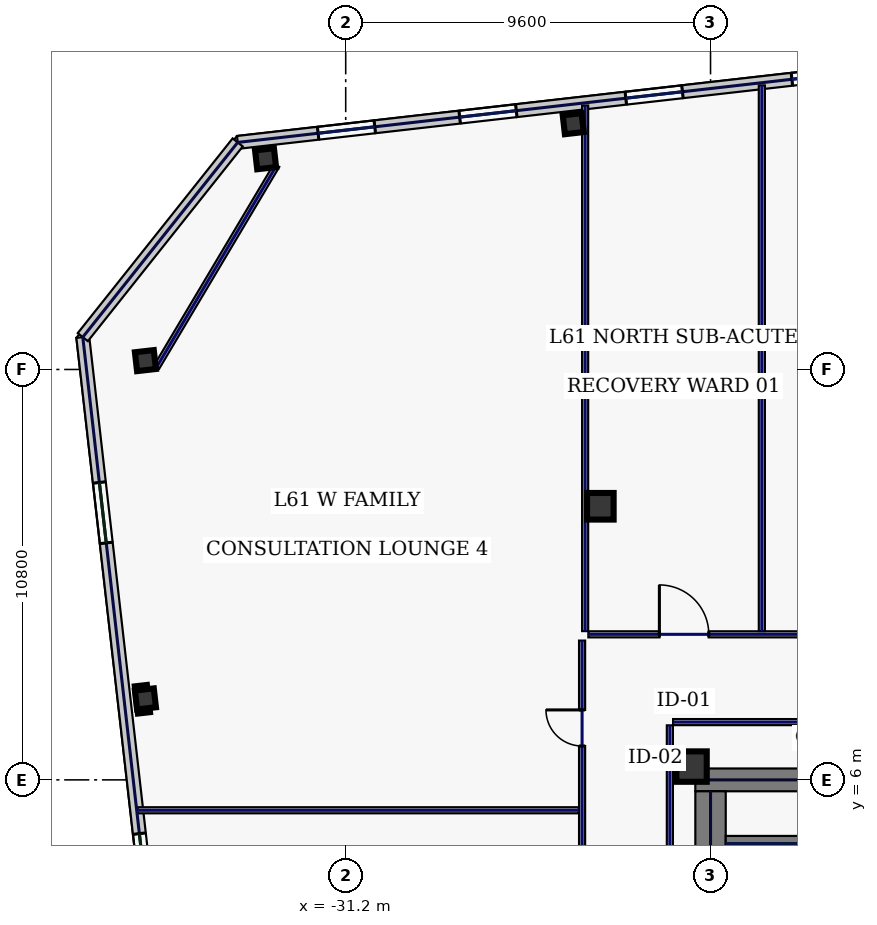
"""IFC4 building model, lengths in metres.
Left out: names, types, materials, properties, quantities, classifications, styles, units other than length and angle.
Written with IfcOpenShell. Run it as: python <this file> out.ifc"""

import sys

from ifc_helpers import new_model, si_unit, direction, frame, frame_2d, origin, origin_2d, place, context, subcontext, project, spatial, rectangle, hollow_rectangle, extrude, element, fill, save


model = new_model("IFC4")
c1 = context("Model", 3, precision=1e-05, world=origin(), true_north=direction((0.0, 1.0)))
c2 = subcontext(c1, "Body", "Model", "MODEL_VIEW")
j1 = project(units=[si_unit("LENGTHUNIT", "METRE"), si_unit("PLANEANGLEUNIT", "RADIAN")], contexts=[c1])
p1 = place(None, origin())
s1 = spatial("IfcSite", under=j1, at=p1, CompositionType="ELEMENT")
p2 = place(p1, origin())
s2 = spatial("IfcBuilding", under=s1, at=p2, CompositionType="ELEMENT")
p3 = place(p2, frame((0.0, 0.0, 263.0)))
s3 = spatial("IfcBuildingStorey", under=s2, at=p3, CompositionType="ELEMENT", Elevation=263.0)
p4 = place(p3, frame((-22.0, 6.0, 0.0), z_axis=(0.0, 0.0, 1.0), x_axis=(1.0, 0.0, 0.0)))
e1 = element("IfcWall", 1, at=p4, inside=s3, PredefinedType="SHEAR", context=c2, shape_type="SweptSolid", body=[
    extrude(rectangle(XDim=11.5, YDim=0.6, at=frame_2d((5.75, 0.0))), origin(), (0.0, 0.0, 1.0), 3.74),
])
p5 = place(p3, frame((-21.6, -5.7, 0.0), z_axis=(0.0, 0.0, 1.0), x_axis=(0.0, 1.0, 0.0)))
e2 = element("IfcWall", 2, at=p5, inside=s3, PredefinedType="SHEAR", context=c2, shape_type="SweptSolid", body=[
    extrude(rectangle(XDim=11.4, YDim=0.8, at=frame_2d((5.7, 0.0))), origin(), (0.0, 0.0, 1.0), 3.74),
])
p6 = place(p3, frame((-21.2, 4.325, 0.0), z_axis=(0.0, 0.0, 1.0), x_axis=(1.0, 0.0, 0.0)))
e3 = element("IfcWall", 3, at=p6, inside=s3, PredefinedType="SHEAR", context=c2, shape_type="SweptSolid", body=[
    extrude(rectangle(XDim=3.4, YDim=0.4, at=frame_2d((1.7, 0.0))), origin(), (0.0, 0.0, 1.0), 3.74),
])
p7 = place(p3, frame((-22.1, 6.35, 0.0), z_axis=(0.0, 0.0, 1.0), x_axis=(1.0, 0.0, 0.0)))
e4 = element("IfcColumn", 4, at=p7, inside=s3, PredefinedType="COLUMN", context=c2, shape_type="SweptSolid", body=[
    extrude(hollow_rectangle(XDim=0.8, YDim=0.8, WallThickness=0.036, at=origin_2d()), origin(), (0.0, 0.0, 1.0), 3.74),
])
p8 = place(p3, frame((-24.5, 13.2, 0.0), z_axis=(0.0, 0.0, 1.0), x_axis=(1.0, 0.0, 0.0)))
e5 = element("IfcColumn", 5, at=p8, inside=s3, PredefinedType="COLUMN", context=c2, shape_type="SweptSolid", body=[
    extrude(hollow_rectangle(XDim=0.7, YDim=0.7, WallThickness=0.032, at=origin_2d()), origin(), (0.0, 0.0, 1.0), 3.74),
])
for number, where, z_axis, x_axis in (
    (6, (-25.212, 23.268, 0.0), (0.0, 0.0, 1.0), (0.994, 0.113, 0.0)),
    (7, (-33.309, 22.345, 0.0), (0.0, 0.0, 1.0), (0.994, 0.113, 0.0)),
    (8, (-36.47, 17.033, 0.0), (0.0, 0.0, 1.0), (0.994, 0.113, 0.0)),
    (9, (-36.47, 8.131, 0.0), (0.0, 0.0, 1.0), (0.994, 0.113, 0.0)),
):
    element("IfcColumn", number, at=place(p3, frame(where, z_axis=z_axis, x_axis=x_axis)), inside=s3, PredefinedType="COLUMN", context=c2, shape_type="SweptSolid", body=[
        extrude(hollow_rectangle(XDim=0.5, YDim=0.5, WallThickness=0.025, at=origin_2d()), origin(), (0.0, 0.0, 1.0), 3.74),
    ])
p9 = place(p3, frame((-15.51, 24.886, 0.0), z_axis=(0.0, 0.0, 1.0), x_axis=(-0.993572271362, -0.113199565282, 0.0)))
e10 = element("IfcWall", 10, at=p9, inside=s3, PredefinedType="STANDARD", context=c2, shape_type="SweptSolid", body=[
    extrude(rectangle(XDim=18.651, YDim=0.34, at=frame_2d((9.326, 0.0))), origin(), (0.0, 0.0, 1.0), 3.74),
])
p10 = place(p9, frame((15.021, 0.0, 0.83)))
e11 = element("IfcOpeningElement", 11, at=p10, cuts=e10, PredefinedType="OPENING", context=c2, shape_type="SweptSolid", body=[
    extrude(rectangle(XDim=1.5, YDim=2.0, at=frame_2d((0.75, 1.0))), frame((0.0, 0.18, 0.0), z_axis=(0.0, -1.0, 0.0), x_axis=(1.0, 0.0, 0.0)), (0.0, 0.0, 1.0), 0.36),
])
p11 = place(p9, frame((11.273, 0.0, 0.83)))
e12 = element("IfcOpeningElement", 12, at=p11, cuts=e10, PredefinedType="OPENING", context=c2, shape_type="SweptSolid", body=[
    extrude(rectangle(XDim=1.5, YDim=2.0, at=frame_2d((0.75, 1.0))), frame((0.0, 0.18, 0.0), z_axis=(0.0, -1.0, 0.0), x_axis=(1.0, 0.0, 0.0)), (0.0, 0.0, 1.0), 0.36),
])
p12 = place(p9, frame((6.873, 0.0, 0.83)))
e13 = element("IfcOpeningElement", 13, at=p12, cuts=e10, PredefinedType="OPENING", context=c2, shape_type="SweptSolid", body=[
    extrude(rectangle(XDim=1.5, YDim=2.0, at=frame_2d((0.75, 1.0))), frame((0.0, 0.18, 0.0), z_axis=(0.0, -1.0, 0.0), x_axis=(1.0, 0.0, 0.0)), (0.0, 0.0, 1.0), 0.36),
])
p13 = place(p9, frame((3.125, 0.0, 0.83)))
e14 = element("IfcOpeningElement", 14, at=p13, cuts=e10, PredefinedType="OPENING", context=c2, shape_type="SweptSolid", body=[
    extrude(rectangle(XDim=0.85, YDim=1.85, at=frame_2d((0.425, 0.925))), frame((0.0, 0.18, 0.0), z_axis=(0.0, -1.0, 0.0), x_axis=(1.0, 0.0, 0.0)), (0.0, 0.0, 1.0), 0.36),
])
p14 = place(p3, frame((-38.118, 17.651, 0.0), z_axis=(0.0, 0.0, 1.0), x_axis=(0.11320360501, -0.9935718111, 0.0)))
e15 = element("IfcWall", 15, at=p14, inside=s3, PredefinedType="STANDARD", context=c2, shape_type="SweptSolid", body=[
    extrude(rectangle(XDim=37.2, YDim=0.34, at=frame_2d((18.6, 0.0))), origin(), (0.0, 0.0, 1.0), 3.74),
])
p15 = place(p14, frame((3.85, 0.0, 0.58)))
e16 = element("IfcOpeningElement", 16, at=p15, cuts=e15, PredefinedType="OPENING", context=c2, shape_type="SweptSolid", body=[
    extrude(rectangle(XDim=1.6, YDim=2.3, at=frame_2d((0.8, 1.15))), frame((0.0, 0.18, 0.0), z_axis=(0.0, -1.0, 0.0), x_axis=(1.0, 0.0, 0.0)), (0.0, 0.0, 1.0), 0.36),
])
p16 = place(p14, frame((13.15, 0.0, 0.58)))
e17 = element("IfcOpeningElement", 17, at=p16, cuts=e15, PredefinedType="OPENING", context=c2, shape_type="SweptSolid", body=[
    extrude(rectangle(XDim=1.6, YDim=2.3, at=frame_2d((0.8, 1.15))), frame((0.0, 0.18, 0.0), z_axis=(0.0, -1.0, 0.0), x_axis=(1.0, 0.0, 0.0)), (0.0, 0.0, 1.0), 0.36),
])
p17 = place(p14, frame((31.75, 0.0, 0.58)))
e18 = element("IfcOpeningElement", 18, at=p17, cuts=e15, PredefinedType="OPENING", context=c2, shape_type="SweptSolid", body=[
    extrude(rectangle(XDim=1.6, YDim=2.3, at=frame_2d((0.8, 1.15))), frame((0.0, 0.18, 0.0), z_axis=(0.0, -1.0, 0.0), x_axis=(1.0, 0.0, 0.0)), (0.0, 0.0, 1.0), 0.36),
])
p18 = place(p3, frame((-34.042, 22.775, 0.0), z_axis=(0.0, 0.0, 1.0), x_axis=(-0.62252823689, -0.78259733853, 0.0)))
e19 = element("IfcWall", 19, at=p18, inside=s3, PredefinedType="STANDARD", context=c2, shape_type="SweptSolid", body=[
    extrude(rectangle(XDim=6.548, YDim=0.34, at=frame_2d((3.274, 0.0))), origin(), (0.0, 0.0, 1.0), 3.74),
])
p19 = place(p3, frame((-33.016, 22.171, 0.0), z_axis=(0.0, 0.0, 1.0), x_axis=(-0.511385266265, -0.859351563359, 0.0)))
e20 = element("IfcWall", 20, at=p19, inside=s3, PredefinedType="PARTITIONING", context=c2, shape_type="SweptSolid", body=[
    extrude(rectangle(XDim=6.182, YDim=0.16, at=frame_2d((3.091, 0.0))), origin(), (0.0, 0.0, 1.0), 3.74),
])
p20 = place(p3, frame((-24.98, -9.615, 0.0), z_axis=(0.0, 0.0, 1.0), x_axis=(0.0, 1.0, 0.0)))
e21 = element("IfcWall", 21, at=p20, inside=s3, PredefinedType="PARTITIONING", context=c2, shape_type="SweptSolid", body=[
    extrude(rectangle(XDim=19.28, YDim=0.16, at=frame_2d((9.64, 0.0))), origin(), (0.0, 0.0, 1.0), 3.74),
])
p21 = place(p20, frame((1.969, 0.0, 0.0)))
e22 = element("IfcOpeningElement", 22, at=p21, cuts=e21, PredefinedType="OPENING", context=c2, shape_type="SweptSolid", body=[
    extrude(rectangle(XDim=0.95, YDim=2.2, at=frame_2d((0.475, 1.1))), frame((0.0, 0.09, 0.0), z_axis=(0.0, -1.0, 0.0), x_axis=(1.0, 0.0, 0.0)), (0.0, 0.0, 1.0), 0.18),
])
p22 = place(p20, frame((7.25, 0.0, 0.0)))
e23 = element("IfcOpeningElement", 23, at=p22, cuts=e21, PredefinedType="OPENING", context=c2, shape_type="SweptSolid", body=[
    extrude(rectangle(XDim=0.95, YDim=2.2, at=frame_2d((0.475, 1.1))), frame((0.0, 0.09, 0.0), z_axis=(0.0, -1.0, 0.0), x_axis=(1.0, 0.0, 0.0)), (0.0, 0.0, 1.0), 0.18),
])
p23 = place(p20, frame((12.45, 0.0, 0.0)))
e24 = element("IfcOpeningElement", 24, at=p23, cuts=e21, PredefinedType="OPENING", context=c2, shape_type="SweptSolid", body=[
    extrude(rectangle(XDim=0.95, YDim=2.2, at=frame_2d((0.475, 1.1))), frame((0.0, 0.09, 0.0), z_axis=(0.0, -1.0, 0.0), x_axis=(1.0, 0.0, 0.0)), (0.0, 0.0, 1.0), 0.18),
])
p24 = place(p20, frame((16.506, 0.0, 0.0)))
e25 = element("IfcOpeningElement", 25, at=p24, cuts=e21, PredefinedType="OPENING", context=c2, shape_type="SweptSolid", body=[
    extrude(rectangle(XDim=0.95, YDim=2.2, at=frame_2d((0.475, 1.1))), frame((0.0, 0.09, 0.0), z_axis=(0.0, -1.0, 0.0), x_axis=(1.0, 0.0, 0.0)), (0.0, 0.0, 1.0), 0.18),
])
p25 = place(p3, frame((-24.815, 9.83, 0.0), z_axis=(0.0, 0.0, 1.0), x_axis=(1.0, 0.0, 0.0)))
e26 = element("IfcWall", 26, at=p25, inside=s3, PredefinedType="PARTITIONING", context=c2, shape_type="SweptSolid", body=[
    extrude(rectangle(XDim=49.63, YDim=0.16, at=frame_2d((24.815, 0.0))), origin(), (0.0, 0.0, 1.0), 3.74),
])
p26 = place(p25, frame((1.869, 0.0, 0.0)))
e27 = element("IfcOpeningElement", 27, at=p26, cuts=e26, PredefinedType="OPENING", context=c2, shape_type="SweptSolid", body=[
    extrude(rectangle(XDim=1.3, YDim=2.2, at=frame_2d((0.65, 1.1))), frame((0.0, 0.09, 0.0), z_axis=(0.0, -1.0, 0.0), x_axis=(1.0, 0.0, 0.0)), (0.0, 0.0, 1.0), 0.18),
])
p27 = place(p25, frame((7.613, 0.0, 0.0)))
e28 = element("IfcOpeningElement", 28, at=p27, cuts=e26, PredefinedType="OPENING", context=c2, shape_type="SweptSolid", body=[
    extrude(rectangle(XDim=0.95, YDim=2.2, at=frame_2d((0.475, 1.1))), frame((0.0, 0.09, 0.0), z_axis=(0.0, -1.0, 0.0), x_axis=(1.0, 0.0, 0.0)), (0.0, 0.0, 1.0), 0.18),
])
p28 = place(p25, frame((14.038, 0.0, 0.0)))
e29 = element("IfcOpeningElement", 29, at=p28, cuts=e26, PredefinedType="OPENING", context=c2, shape_type="SweptSolid", body=[
    extrude(rectangle(XDim=0.95, YDim=2.2, at=frame_2d((0.475, 1.1))), frame((0.0, 0.09, 0.0), z_axis=(0.0, -1.0, 0.0), x_axis=(1.0, 0.0, 0.0)), (0.0, 0.0, 1.0), 0.18),
])
p29 = place(p25, frame((21.125, 0.0, 0.0)))
e30 = element("IfcOpeningElement", 30, at=p29, cuts=e26, PredefinedType="OPENING", context=c2, shape_type="SweptSolid", body=[
    extrude(rectangle(XDim=1.3, YDim=2.2, at=frame_2d((0.65, 1.1))), frame((0.0, 0.09, 0.0), z_axis=(0.0, -1.0, 0.0), x_axis=(1.0, 0.0, 0.0)), (0.0, 0.0, 1.0), 0.18),
])
p30 = place(p25, frame((29.225, 0.0, 0.0)))
e31 = element("IfcOpeningElement", 31, at=p30, cuts=e26, PredefinedType="OPENING", context=c2, shape_type="SweptSolid", body=[
    extrude(rectangle(XDim=1.3, YDim=2.2, at=frame_2d((0.65, 1.1))), frame((0.0, 0.09, 0.0), z_axis=(0.0, -1.0, 0.0), x_axis=(1.0, 0.0, 0.0)), (0.0, 0.0, 1.0), 0.18),
])
p31 = place(p25, frame((36.312, 0.0, 0.0)))
e32 = element("IfcOpeningElement", 32, at=p31, cuts=e26, PredefinedType="OPENING", context=c2, shape_type="SweptSolid", body=[
    extrude(rectangle(XDim=0.95, YDim=2.2, at=frame_2d((0.475, 1.1))), frame((0.0, 0.09, 0.0), z_axis=(0.0, -1.0, 0.0), x_axis=(1.0, 0.0, 0.0)), (0.0, 0.0, 1.0), 0.18),
])
p32 = place(p25, frame((41.863, 0.0, 0.0)))
e33 = element("IfcOpeningElement", 33, at=p32, cuts=e26, PredefinedType="OPENING", context=c2, shape_type="SweptSolid", body=[
    extrude(rectangle(XDim=1.3, YDim=2.2, at=frame_2d((0.65, 1.1))), frame((0.0, 0.09, 0.0), z_axis=(0.0, -1.0, 0.0), x_axis=(1.0, 0.0, 0.0)), (0.0, 0.0, 1.0), 0.18),
])
p33 = place(p25, frame((46.806, 0.0, 0.0)))
e34 = element("IfcOpeningElement", 34, at=p33, cuts=e26, PredefinedType="OPENING", context=c2, shape_type="SweptSolid", body=[
    extrude(rectangle(XDim=0.95, YDim=2.2, at=frame_2d((0.475, 1.1))), frame((0.0, 0.09, 0.0), z_axis=(0.0, -1.0, 0.0), x_axis=(1.0, 0.0, 0.0)), (0.0, 0.0, 1.0), 0.18),
])
p34 = place(p3, frame((-10.715, 7.52, 0.0), z_axis=(0.0, 0.0, 1.0), x_axis=(-1.0, 0.0, 0.0)))
e35 = element("IfcWall", 35, at=p34, inside=s3, PredefinedType="PARTITIONING", context=c2, shape_type="SweptSolid", body=[
    extrude(rectangle(XDim=11.87, YDim=0.16, at=frame_2d((5.935, 0.0))), origin(), (0.0, 0.0, 1.0), 3.74),
])
p35 = place(p3, frame((-22.67, 7.435, 0.0), z_axis=(0.0, 0.0, 1.0), x_axis=(0.0, -1.0, 0.0)))
e36 = element("IfcWall", 36, at=p35, inside=s3, PredefinedType="PARTITIONING", context=c2, shape_type="SweptSolid", body=[
    extrude(rectangle(XDim=14.82, YDim=0.16, at=frame_2d((7.41, 0.0))), origin(), (0.0, 0.0, 1.0), 3.74),
])
p36 = place(p3, frame((-24.9, 9.915, 0.0), z_axis=(0.0, 0.0, 1.0), x_axis=(0.0, 1.0, 0.0)))
e37 = element("IfcWall", 37, at=p36, inside=s3, PredefinedType="PARTITIONING", context=c2, shape_type="SweptSolid", body=[
    extrude(rectangle(XDim=13.831, YDim=0.16, at=frame_2d((6.916, 0.0))), origin(), (0.0, 0.0, 1.0), 3.285),
])
p37 = place(p3, frame((-20.25, 9.915, 0.0), z_axis=(0.0, 0.0, 1.0), x_axis=(0.0, 1.0, 0.0)))
e38 = element("IfcWall", 38, at=p37, inside=s3, PredefinedType="PARTITIONING", context=c2, shape_type="SweptSolid", body=[
    extrude(rectangle(XDim=14.361, YDim=0.16, at=frame_2d((7.181, 0.0))), origin(), (0.0, 0.0, 1.0), 3.74),
])
p38 = place(p3, frame((-36.679, 5.2, 0.0), z_axis=(0.0, 0.0, 1.0), x_axis=(1.0, 0.0, 0.0)))
e39 = element("IfcWall", 39, at=p38, inside=s3, PredefinedType="PARTITIONING", context=c2, shape_type="SweptSolid", body=[
    extrude(rectangle(XDim=11.615, YDim=0.16, at=frame_2d((5.807, 0.0))), origin(), (0.0, 0.0, 1.0), 3.74),
])
p39 = place(p10, origin())
e40 = element("IfcWindow", 40, at=p39, inside=s3, PartitioningType="SINGLE_PANEL", PredefinedType="WINDOW", context=c2, shape_type="SweptSolid", body=[
    extrude(rectangle(XDim=1.5, YDim=2.0, at=frame_2d((0.75, 1.0))), frame((0.0, 0.03, 0.0), z_axis=(0.0, -1.0, 0.0), x_axis=(1.0, 0.0, 0.0)), (0.0, 0.0, 1.0), 0.06),
])
fill(e11, e40)
p40 = place(p11, origin())
e41 = element("IfcWindow", 41, at=p40, inside=s3, PartitioningType="SINGLE_PANEL", PredefinedType="WINDOW", context=c2, shape_type="SweptSolid", body=[
    extrude(rectangle(XDim=1.5, YDim=2.0, at=frame_2d((0.75, 1.0))), frame((0.0, 0.03, 0.0), z_axis=(0.0, -1.0, 0.0), x_axis=(1.0, 0.0, 0.0)), (0.0, 0.0, 1.0), 0.06),
])
fill(e12, e41)
p41 = place(p12, origin())
e42 = element("IfcWindow", 42, at=p41, inside=s3, PartitioningType="SINGLE_PANEL", PredefinedType="WINDOW", context=c2, shape_type="SweptSolid", body=[
    extrude(rectangle(XDim=1.5, YDim=2.0, at=frame_2d((0.75, 1.0))), frame((0.0, 0.03, 0.0), z_axis=(0.0, -1.0, 0.0), x_axis=(1.0, 0.0, 0.0)), (0.0, 0.0, 1.0), 0.06),
])
fill(e13, e42)
p42 = place(p13, origin())
e43 = element("IfcWindow", 43, at=p42, inside=s3, PartitioningType="SINGLE_PANEL", PredefinedType="WINDOW", context=c2, shape_type="SweptSolid", body=[
    extrude(rectangle(XDim=0.85, YDim=1.85, at=frame_2d((0.425, 0.925))), frame((0.0, 0.03, 0.0), z_axis=(0.0, -1.0, 0.0), x_axis=(1.0, 0.0, 0.0)), (0.0, 0.0, 1.0), 0.06),
])
fill(e14, e43)
p43 = place(p15, origin())
e44 = element("IfcWindow", 44, at=p43, inside=s3, PartitioningType="SINGLE_PANEL", PredefinedType="WINDOW", context=c2, shape_type="SweptSolid", body=[
    extrude(rectangle(XDim=1.6, YDim=2.3, at=frame_2d((0.8, 1.15))), frame((0.0, 0.03, 0.0), z_axis=(0.0, -1.0, 0.0), x_axis=(1.0, 0.0, 0.0)), (0.0, 0.0, 1.0), 0.06),
])
fill(e16, e44)
p44 = place(p16, origin())
e45 = element("IfcWindow", 45, at=p44, inside=s3, PartitioningType="SINGLE_PANEL", PredefinedType="WINDOW", context=c2, shape_type="SweptSolid", body=[
    extrude(rectangle(XDim=1.6, YDim=2.3, at=frame_2d((0.8, 1.15))), frame((0.0, 0.03, 0.0), z_axis=(0.0, -1.0, 0.0), x_axis=(1.0, 0.0, 0.0)), (0.0, 0.0, 1.0), 0.06),
])
fill(e17, e45)
p45 = place(p26, origin())
e46 = element("IfcDoor", 46, at=p45, inside=s3, OperationType="SINGLE_SWING_LEFT", PredefinedType="DOOR", context=c2, shape_type="SweptSolid", body=[
    extrude(rectangle(XDim=1.3, YDim=2.2, at=frame_2d((0.65, 1.1))), frame((0.0, 0.025, 0.0), z_axis=(0.0, -1.0, 0.0), x_axis=(1.0, 0.0, 0.0)), (0.0, 0.0, 1.0), 0.05),
])
fill(e27, e46)
p46 = place(p24, origin())
e47 = element("IfcDoor", 47, at=p46, inside=s3, OperationType="SINGLE_SWING_RIGHT", PredefinedType="DOOR", context=c2, shape_type="SweptSolid", body=[
    extrude(rectangle(XDim=0.95, YDim=2.2, at=frame_2d((0.475, 1.1))), frame((0.0, 0.025, 0.0), z_axis=(0.0, -1.0, 0.0), x_axis=(1.0, 0.0, 0.0)), (0.0, 0.0, 1.0), 0.05),
])
fill(e25, e47)
save(model, sys.argv[1])
